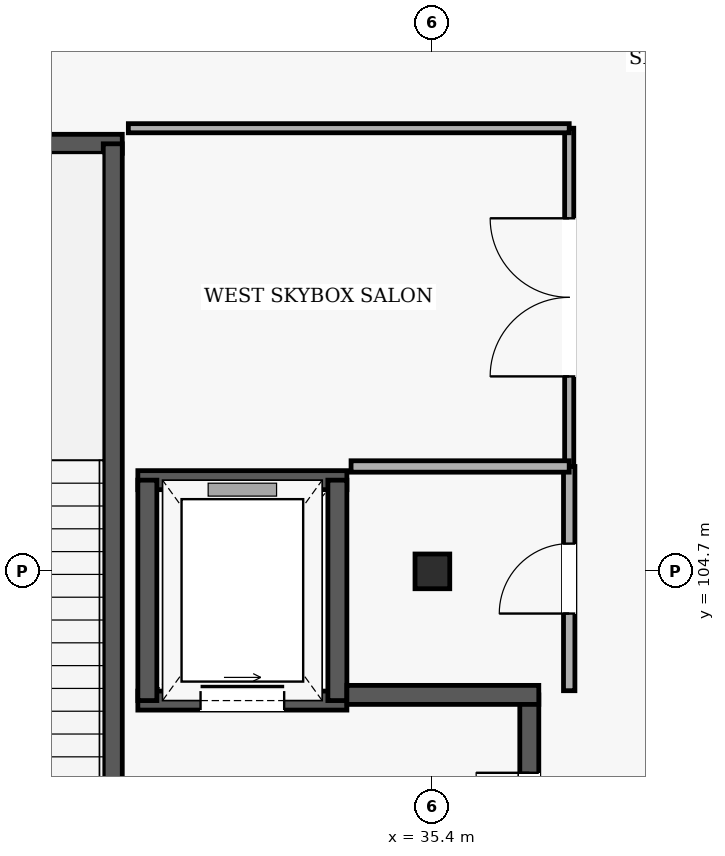
"""IFC4 building model, lengths in metres.
Left out: names, types, materials, properties, quantities, classifications, styles, units other than length and angle.
Written with IfcOpenShell. Run it as: python <this file> out.ifc"""

import sys

from ifc_helpers import new_model, si_unit, direction, frame, frame_2d, origin, origin_2d, place, context, subcontext, project, spatial, rectangle, hollow_circle, extrude, element, fill, save


model = new_model("IFC4")
c1 = context("Model", 3, precision=1e-05, world=origin(), true_north=direction((0.0, 1.0)))
c2 = subcontext(c1, "Body", "Model", "MODEL_VIEW")
j1 = project(units=[si_unit("LENGTHUNIT", "METRE"), si_unit("PLANEANGLEUNIT", "RADIAN")], contexts=[c1])
p1 = place(None, origin())
s1 = spatial("IfcSite", under=j1, at=p1, CompositionType="ELEMENT")
p2 = place(p1, origin())
s2 = spatial("IfcBuilding", under=s1, at=p2, CompositionType="ELEMENT")
p3 = place(p2, frame((0.0, 0.0, 19.8)))
s3 = spatial("IfcBuildingStorey", under=s2, at=p3, CompositionType="ELEMENT", Elevation=19.8)
p4 = place(p3, frame((35.4, 104.7, 0.0), z_axis=(0.0, 0.0, 1.0), x_axis=(1.0, 0.0, 0.0)))
e1 = element("IfcColumn", 1, at=p4, inside=s3, PredefinedType="COLUMN", context=c2, shape_type="SweptSolid", body=[
    extrude(hollow_circle(Radius=0.229, WallThickness=0.02, at=origin_2d()), origin(), (0.0, 0.0, 1.0), 4.8),
])
p5 = place(p3, frame((31.32, 110.325, 0.0), z_axis=(0.0, 0.0, 1.0), x_axis=(-1.0, 0.0, 0.0)))
e2 = element("IfcWall", 2, at=p5, inside=s3, PredefinedType="SHEAR", context=c2, shape_type="SweptSolid", body=[
    extrude(rectangle(XDim=5.37, YDim=0.25, at=frame_2d((2.685, 0.0))), origin(), (0.0, 0.0, 1.0), 4.5),
])
p6 = place(p3, frame((31.195, 99.475, 0.0), z_axis=(0.0, 0.0, 1.0), x_axis=(0.0, 1.0, 0.0)))
e3 = element("IfcWall", 3, at=p6, inside=s3, PredefinedType="SHEAR", context=c2, shape_type="SweptSolid", body=[
    extrude(rectangle(XDim=10.85, YDim=0.25, at=frame_2d((5.425, 0.0))), origin(), (0.0, 0.0, 1.0), 4.5),
])
p7 = place(p6, frame((0.52, 0.0, 0.0)))
e4 = element("IfcOpeningElement", 4, at=p7, cuts=e3, PredefinedType="OPENING", context=c2, shape_type="SweptSolid", body=[
    extrude(rectangle(XDim=1.4, YDim=2.15, at=frame_2d((0.7, 1.075))), frame((0.0, 0.135, 0.0), z_axis=(0.0, -1.0, 0.0), x_axis=(1.0, 0.0, 0.0)), (0.0, 0.0, 1.0), 0.27),
])
p8 = place(p3, frame((31.525, 103.0, 0.0), z_axis=(0.0, 0.0, 1.0), x_axis=(1.0, 0.0, 0.0)))
e5 = element("IfcWall", 5, at=p8, inside=s3, PredefinedType="SHEAR", context=c2, shape_type="SweptSolid", body=[
    extrude(rectangle(XDim=2.75, YDim=0.25, at=frame_2d((1.375, 0.0))), origin(), (0.0, 0.0, 1.0), 4.5),
])
p9 = place(p8, frame((0.825, 0.0, 0.0)))
e6 = element("IfcOpeningElement", 6, at=p9, cuts=e5, PredefinedType="OPENING", context=c2, shape_type="SweptSolid", body=[
    extrude(rectangle(XDim=1.1, YDim=2.15, at=frame_2d((0.55, 1.075))), frame((0.0, 0.135, 0.0), z_axis=(0.0, -1.0, 0.0), x_axis=(1.0, 0.0, 0.0)), (0.0, 0.0, 1.0), 0.27),
])
p10 = place(p3, frame((34.275, 105.9, 0.0), z_axis=(0.0, 0.0, 1.0), x_axis=(-1.0, 0.0, 0.0)))
e7 = element("IfcWall", 7, at=p10, inside=s3, PredefinedType="SHEAR", context=c2, shape_type="SweptSolid", body=[
    extrude(rectangle(XDim=2.75, YDim=0.25, at=frame_2d((1.375, 0.0))), origin(), (0.0, 0.0, 1.0), 4.5),
])
for number, where, z_axis, x_axis in (
    (8, (31.65, 105.9, 0.0), (0.0, 0.0, 1.0), (0.0, -1.0, 0.0)),
    (9, (34.15, 103.0, 0.0), (0.0, 0.0, 1.0), (0.0, 1.0, 0.0)),
):
    element("IfcWall", number, at=place(p3, frame(where, z_axis=z_axis, x_axis=x_axis)), inside=s3, PredefinedType="SHEAR", context=c2, shape_type="SweptSolid", body=[
        extrude(rectangle(XDim=2.9, YDim=0.25, at=frame_2d((1.45, 0.0))), origin(), (0.0, 0.0, 1.0), 4.5),
    ])
p11 = place(p3, frame((36.675, 99.625, 0.0), z_axis=(0.0, 0.0, 1.0), x_axis=(0.0, 1.0, 0.0)))
e10 = element("IfcWall", 10, at=p11, inside=s3, PredefinedType="SHEAR", context=c2, shape_type="SweptSolid", body=[
    extrude(rectangle(XDim=3.45, YDim=0.25, at=frame_2d((1.725, 0.0))), origin(), (0.0, 0.0, 1.0), 4.5),
])
p12 = place(p11, frame((1.025, 0.0, 0.0)))
e11 = element("IfcOpeningElement", 11, at=p12, cuts=e10, PredefinedType="OPENING", context=c2, shape_type="SweptSolid", body=[
    extrude(rectangle(XDim=1.4, YDim=2.15, at=frame_2d((0.7, 1.075))), frame((0.0, 0.135, 0.0), z_axis=(0.0, -1.0, 0.0), x_axis=(1.0, 0.0, 0.0)), (0.0, 0.0, 1.0), 0.27),
])
p13 = place(p3, frame((34.275, 103.075, 0.0), z_axis=(0.0, 0.0, 1.0), x_axis=(1.0, 0.0, 0.0)))
e12 = element("IfcWall", 12, at=p13, inside=s3, PredefinedType="SHEAR", context=c2, shape_type="SweptSolid", body=[
    extrude(rectangle(XDim=2.525, YDim=0.25, at=frame_2d((1.263, 0.0))), origin(), (0.0, 0.0, 1.0), 4.5),
])
p14 = place(p3, frame((37.2, 106.08, 0.0), z_axis=(0.0, 0.0, 1.0), x_axis=(0.0, 1.0, 0.0)))
e13 = element("IfcWall", 13, at=p14, inside=s3, PredefinedType="PARTITIONING", context=c2, shape_type="SweptSolid", body=[
    extrude(rectangle(XDim=4.45, YDim=0.12, at=frame_2d((2.225, 0.0))), origin(), (0.0, 0.0, 1.0), 4.5),
])
p15 = place(p14, frame((1.185, 0.0, 0.0)))
e14 = element("IfcOpeningElement", 14, at=p15, cuts=e13, PredefinedType="OPENING", context=c2, shape_type="SweptSolid", body=[
    extrude(rectangle(XDim=2.08, YDim=2.35, at=frame_2d((1.04, 1.175))), frame((0.0, 0.07, 0.0), z_axis=(0.0, -1.0, 0.0), x_axis=(1.0, 0.0, 0.0)), (0.0, 0.0, 1.0), 0.14),
])
p16 = place(p3, frame((37.2, 110.53, 0.0), z_axis=(0.0, 0.0, 1.0), x_axis=(-1.0, 0.0, 0.0)))
e15 = element("IfcWall", 15, at=p16, inside=s3, PredefinedType="PARTITIONING", context=c2, shape_type="SweptSolid", body=[
    extrude(rectangle(XDim=5.8, YDim=0.12, at=frame_2d((2.9, 0.0))), origin(), (0.0, 0.0, 1.0), 4.5),
])
p17 = place(p3, frame((37.2, 103.13, 0.0), z_axis=(0.0, 0.0, 1.0), x_axis=(0.0, 1.0, 0.0)))
e16 = element("IfcWall", 16, at=p17, inside=s3, PredefinedType="PARTITIONING", context=c2, shape_type="SweptSolid", body=[
    extrude(rectangle(XDim=2.95, YDim=0.15, at=frame_2d((1.475, 0.0))), origin(), (0.0, 0.0, 1.0), 4.5),
])
p18 = place(p17, frame((1.015, 0.0, 0.0)))
e17 = element("IfcOpeningElement", 17, at=p18, cuts=e16, PredefinedType="OPENING", context=c2, shape_type="SweptSolid", body=[
    extrude(rectangle(XDim=0.92, YDim=2.1, at=frame_2d((0.46, 1.05))), frame((0.0, 0.085, 0.0), z_axis=(0.0, -1.0, 0.0), x_axis=(1.0, 0.0, 0.0)), (0.0, 0.0, 1.0), 0.17),
])
p19 = place(p3, frame((37.2, 106.08, 0.0), z_axis=(0.0, 0.0, 1.0), x_axis=(-1.0, 0.0, 0.0)))
e18 = element("IfcWall", 18, at=p19, inside=s3, PredefinedType="PARTITIONING", context=c2, shape_type="SweptSolid", body=[
    extrude(rectangle(XDim=2.87, YDim=0.15, at=frame_2d((1.435, 0.0))), origin(), (0.0, 0.0, 1.0), 4.5),
])
p20 = place(p9, origin())
e19 = element("IfcDoor", 19, at=p20, inside=s3, OperationType="SLIDING_TO_LEFT", PredefinedType="DOOR", context=c2, shape_type="SweptSolid", body=[
    extrude(rectangle(XDim=1.1, YDim=2.15, at=frame_2d((0.55, 1.075))), frame((0.0, 0.025, 0.0), z_axis=(0.0, -1.0, 0.0), x_axis=(1.0, 0.0, 0.0)), (0.0, 0.0, 1.0), 0.05),
])
fill(e6, e19)
p21 = place(p12, origin())
e20 = element("IfcDoor", 20, at=p21, inside=s3, OperationType="DOUBLE_DOOR_SINGLE_SWING", PredefinedType="DOOR", context=c2, shape_type="SweptSolid", body=[
    extrude(rectangle(XDim=1.4, YDim=2.15, at=frame_2d((0.7, 1.075))), frame((0.0, 0.025, 0.0), z_axis=(0.0, -1.0, 0.0), x_axis=(1.0, 0.0, 0.0)), (0.0, 0.0, 1.0), 0.05),
])
fill(e11, e20)
p22 = place(p15, origin())
e21 = element("IfcDoor", 21, at=p22, inside=s3, OperationType="DOUBLE_DOOR_SINGLE_SWING", PredefinedType="DOOR", context=c2, shape_type="SweptSolid", body=[
    extrude(rectangle(XDim=2.08, YDim=2.35, at=frame_2d((1.04, 1.175))), frame((0.0, 0.025, 0.0), z_axis=(0.0, -1.0, 0.0), x_axis=(1.0, 0.0, 0.0)), (0.0, 0.0, 1.0), 0.05),
])
fill(e14, e21)
p23 = place(p18, origin())
e22 = element("IfcDoor", 22, at=p23, inside=s3, OperationType="SINGLE_SWING_LEFT", PredefinedType="DOOR", context=c2, shape_type="SweptSolid", body=[
    extrude(rectangle(XDim=0.92, YDim=2.1, at=frame_2d((0.46, 1.05))), frame((0.0, 0.025, 0.0), z_axis=(0.0, -1.0, 0.0), x_axis=(1.0, 0.0, 0.0)), (0.0, 0.0, 1.0), 0.05),
])
fill(e17, e22)
save(model, sys.argv[1])
